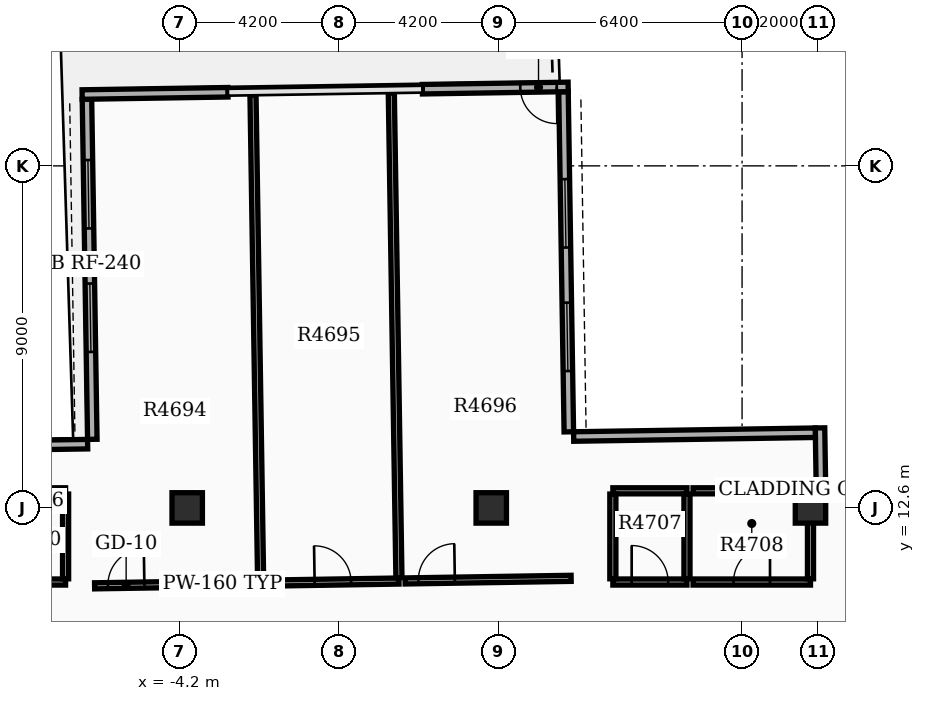
"""IFC4 building model, lengths in metres.
Left out: names, types, materials, properties, quantities, classifications, styles, units other than length and angle.
Written with IfcOpenShell. Run it as: python <this file> out.ifc"""

import sys

from ifc_helpers import new_model, si_unit, direction, frame, frame_2d, origin, origin_2d, place, context, subcontext, project, spatial, rectangle, extrude, element, fill, save


model = new_model("IFC4")
c1 = context("Model", 3, precision=1e-05, world=origin(), true_north=direction((0.0, 1.0)))
c2 = subcontext(c1, "Body", "Model", "MODEL_VIEW")
j1 = project(units=[si_unit("LENGTHUNIT", "METRE"), si_unit("PLANEANGLEUNIT", "RADIAN")], contexts=[c1])
p1 = place(None, origin())
s1 = spatial("IfcSite", under=j1, at=p1, CompositionType="ELEMENT")
p2 = place(p1, origin())
s2 = spatial("IfcBuilding", under=s1, at=p2, CompositionType="ELEMENT")
p3 = place(p2, frame((0.0, 0.0, 303.9)))
s3 = spatial("IfcBuildingStorey", under=s2, at=p3, CompositionType="ELEMENT", Elevation=303.9)
for number, where, z_axis, x_axis in (
    (1, (12.4, 12.6, 0.0), (0.0, 0.0, 1.0), (1.0, 0.0, 0.0)),
    (2, (4.0, 12.6, 0.0), (0.0, 0.0, 1.0), (1.0, 0.0, 0.0)),
    (3, (-4.0, 12.6, 0.0), (0.0, 0.0, 1.0), (1.0, 0.0, 0.0)),
):
    element("IfcColumn", number, at=place(p3, frame(where, z_axis=z_axis, x_axis=x_axis)), inside=s3, PredefinedType="COLUMN", context=c2, shape_type="SweptSolid", body=[
        extrude(rectangle(XDim=0.8, YDim=0.8, at=origin_2d()), origin(), (0.0, 0.0, 1.0), 4.5),
    ])
p4 = place(p3, frame((6.042, 14.602, 0.0), z_axis=(0.0, 0.0, 1.0), x_axis=(-0.015712579601, 0.999876549801, 0.0)))
e4 = element("IfcWall", 4, at=p4, inside=s3, PredefinedType="STANDARD", context=c2, shape_type="SweptSolid", body=[
    extrude(rectangle(XDim=8.95, YDim=0.25, at=frame_2d((4.475, 0.0))), origin(), (0.0, 0.0, 1.0), 3.73),
])
p5 = place(p4, frame((1.6, 0.0, 0.8)))
e5 = element("IfcOpeningElement", 5, at=p5, cuts=e4, PredefinedType="OPENING", context=c2, shape_type="SweptSolid", body=[
    extrude(rectangle(XDim=1.8, YDim=1.8, at=frame_2d((0.9, 0.9))), frame((0.0, 0.135, 0.0), z_axis=(0.0, -1.0, 0.0), x_axis=(1.0, 0.0, 0.0)), (0.0, 0.0, 1.0), 0.27),
])
p6 = place(p4, frame((4.85, 0.0, 0.8)))
e6 = element("IfcOpeningElement", 6, at=p6, cuts=e4, PredefinedType="OPENING", context=c2, shape_type="SweptSolid", body=[
    extrude(rectangle(XDim=1.8, YDim=1.8, at=frame_2d((0.9, 0.9))), frame((0.0, 0.135, 0.0), z_axis=(0.0, -1.0, 0.0), x_axis=(1.0, 0.0, 0.0)), (0.0, 0.0, 1.0), 0.27),
])
p7 = place(p3, frame((-6.638, 23.354, 0.0), z_axis=(0.0, 0.0, 1.0), x_axis=(0.015712579601, -0.999876549801, 0.0)))
e7 = element("IfcWall", 7, at=p7, inside=s3, PredefinedType="STANDARD", context=c2, shape_type="SweptSolid", body=[
    extrude(rectangle(XDim=8.95, YDim=0.25, at=frame_2d((4.475, 0.0))), origin(), (0.0, 0.0, 1.0), 3.73),
])
p8 = place(p7, frame((1.6, 0.0, 0.8)))
e8 = element("IfcOpeningElement", 8, at=p8, cuts=e7, PredefinedType="OPENING", context=c2, shape_type="SweptSolid", body=[
    extrude(rectangle(XDim=1.8, YDim=1.8, at=frame_2d((0.9, 0.9))), frame((0.0, 0.135, 0.0), z_axis=(0.0, -1.0, 0.0), x_axis=(1.0, 0.0, 0.0)), (0.0, 0.0, 1.0), 0.27),
])
p9 = place(p7, frame((4.85, 0.0, 0.8)))
e9 = element("IfcOpeningElement", 9, at=p9, cuts=e7, PredefinedType="OPENING", context=c2, shape_type="SweptSolid", body=[
    extrude(rectangle(XDim=1.8, YDim=1.8, at=frame_2d((0.9, 0.9))), frame((0.0, 0.135, 0.0), z_axis=(0.0, -1.0, 0.0), x_axis=(1.0, 0.0, 0.0)), (0.0, 0.0, 1.0), 0.27),
])
p10 = place(p3, frame((6.024, 23.677, 0.0), z_axis=(0.0, 0.0, 1.0), x_axis=(-0.999876487775, -0.015716526186, 0.0)))
e10 = element("IfcWall", 10, at=p10, inside=s3, PredefinedType="STANDARD", context=c2, shape_type="SweptSolid", body=[
    extrude(rectangle(XDim=3.837, YDim=0.25, at=frame_2d((1.918, 0.0))), origin(), (0.0, 0.0, 1.0), 3.73),
])
p11 = place(p10, frame((0.3, 0.0, 0.0)))
e11 = element("IfcOpeningElement", 11, at=p11, cuts=e10, PredefinedType="OPENING", context=c2, shape_type="SweptSolid", body=[
    extrude(rectangle(XDim=0.96, YDim=2.1, at=frame_2d((0.48, 1.05))), frame((0.0, 0.135, 0.0), z_axis=(0.0, -1.0, 0.0), x_axis=(1.0, 0.0, 0.0)), (0.0, 0.0, 1.0), 0.27),
])
p12 = place(p3, frame((-2.928, 23.537, 0.0), z_axis=(0.0, 0.0, 1.0), x_axis=(-0.99987650349, -0.015715526335, 0.0)))
e12 = element("IfcWall", 12, at=p12, inside=s3, PredefinedType="STANDARD", context=c2, shape_type="SweptSolid", body=[
    extrude(rectangle(XDim=3.837, YDim=0.25, at=frame_2d((1.918, 0.0))), origin(), (0.0, 0.0, 1.0), 3.73),
])
p13 = place(p3, frame((14.051, 13.102, 0.0), z_axis=(0.0, 0.0, 1.0), x_axis=(-0.999877904354, -0.015626144237, 0.0)))
e13 = element("IfcWall", 13, at=p13, inside=s3, PredefinedType="STANDARD", context=c2, shape_type="SweptSolid", body=[
    extrude(rectangle(XDim=1.25, YDim=0.25, at=frame_2d((0.625, 0.0))), origin(), (0.0, 0.0, 1.0), 3.73),
])
p14 = place(p3, frame((12.674, 13.206, 0.0), z_axis=(0.0, 0.0, 1.0), x_axis=(-0.015625635615, 0.999877912303, 0.0)))
e14 = element("IfcWall", 14, at=p14, inside=s3, PredefinedType="STANDARD", context=c2, shape_type="SweptSolid", body=[
    extrude(rectangle(XDim=1.5, YDim=0.25, at=frame_2d((0.75, 0.0))), origin(), (0.0, 0.0, 1.0), 3.73),
])
p15 = place(p3, frame((12.528, 14.579, 0.0), z_axis=(0.0, 0.0, 1.0), x_axis=(-0.999876749821, -0.015699846079, 0.0)))
e15 = element("IfcWall", 15, at=p15, inside=s3, PredefinedType="STANDARD", context=c2, shape_type="SweptSolid", body=[
    extrude(rectangle(XDim=6.36, YDim=0.25, at=frame_2d((3.18, 0.0))), origin(), (0.0, 0.0, 1.0), 3.73),
])
p16 = place(p3, frame((-12.979, 14.178, 0.0), z_axis=(0.0, 0.0, 1.0), x_axis=(0.999876740359, 0.015700448681, 0.0)))
e16 = element("IfcWall", 16, at=p16, inside=s3, PredefinedType="STANDARD", context=c2, shape_type="SweptSolid", body=[
    extrude(rectangle(XDim=6.36, YDim=0.25, at=frame_2d((3.18, 0.0))), origin(), (0.0, 0.0, 1.0), 3.73),
])
p17 = place(p3, frame((-6.437, 10.55, 0.0), z_axis=(0.0, 0.0, 1.0), x_axis=(0.999876776552, 0.015698143603, 0.0)))
e17 = element("IfcWall", 17, at=p17, inside=s3, PredefinedType="PARTITIONING", context=c2, shape_type="SweptSolid", body=[
    extrude(rectangle(XDim=4.37, YDim=0.16, at=frame_2d((2.185, 0.0))), origin(), (0.0, 0.0, 1.0), 3.72),
])
p18 = place(p17, frame((0.35, 0.0, 0.0)))
e18 = element("IfcOpeningElement", 18, at=p18, cuts=e17, PredefinedType="OPENING", context=c2, shape_type="SweptSolid", body=[
    extrude(rectangle(XDim=0.96, YDim=2.15, at=frame_2d((0.48, 1.075))), frame((0.0, 0.09, 0.0), z_axis=(0.0, -1.0, 0.0), x_axis=(1.0, 0.0, 0.0)), (0.0, 0.0, 1.0), 0.18),
])
p19 = place(p3, frame((-2.068, 10.704, 0.0), z_axis=(0.0, 0.0, 1.0), x_axis=(-0.015708274229, 0.999876617449, 0.0)))
e19 = element("IfcWall", 19, at=p19, inside=s3, PredefinedType="PARTITIONING", context=c2, shape_type="SweptSolid", body=[
    extrude(rectangle(XDim=12.76, YDim=0.16, at=frame_2d((6.38, 0.0))), origin(), (0.0, 0.0, 1.0), 3.72),
])
p20 = place(p3, frame((-1.907, 10.621, 0.0), z_axis=(0.0, 0.0, 1.0), x_axis=(0.999876509383, 0.015715151424, 0.0)))
e20 = element("IfcWall", 20, at=p20, inside=s3, PredefinedType="PARTITIONING", context=c2, shape_type="SweptSolid", body=[
    extrude(rectangle(XDim=3.48, YDim=0.16, at=frame_2d((1.74, 0.0))), origin(), (0.0, 0.0, 1.0), 3.72),
])
p21 = place(p20, frame((1.26, 0.0, 0.0)))
e21 = element("IfcOpeningElement", 21, at=p21, cuts=e20, PredefinedType="OPENING", context=c2, shape_type="SweptSolid", body=[
    extrude(rectangle(XDim=0.96, YDim=2.15, at=frame_2d((0.48, 1.075))), frame((0.0, 0.09, 0.0), z_axis=(0.0, -1.0, 0.0), x_axis=(1.0, 0.0, 0.0)), (0.0, 0.0, 1.0), 0.18),
])
p22 = place(p3, frame((1.571, 10.761, 0.0), z_axis=(0.0, 0.0, 1.0), x_axis=(-0.01572770348, 0.999876312022, 0.0)))
e22 = element("IfcWall", 22, at=p22, inside=s3, PredefinedType="PARTITIONING", context=c2, shape_type="SweptSolid", body=[
    extrude(rectangle(XDim=12.76, YDim=0.16, at=frame_2d((6.38, 0.0))), origin(), (0.0, 0.0, 1.0), 3.72),
])
p23 = place(p3, frame((1.732, 10.678, 0.0), z_axis=(0.0, 0.0, 1.0), x_axis=(0.999875884253, 0.015754875083, 0.0)))
e23 = element("IfcWall", 23, at=p23, inside=s3, PredefinedType="PARTITIONING", context=c2, shape_type="SweptSolid", body=[
    extrude(rectangle(XDim=4.37, YDim=0.16, at=frame_2d((2.185, 0.0))), origin(), (0.0, 0.0, 1.0), 3.72),
])
p24 = place(p23, frame((0.35, 0.0, 0.0)))
e24 = element("IfcOpeningElement", 24, at=p24, cuts=e23, PredefinedType="OPENING", context=c2, shape_type="SweptSolid", body=[
    extrude(rectangle(XDim=0.96, YDim=2.15, at=frame_2d((0.48, 1.075))), frame((0.0, 0.09, 0.0), z_axis=(0.0, -1.0, 0.0), x_axis=(1.0, 0.0, 0.0)), (0.0, 0.0, 1.0), 0.18),
])
p25 = place(p3, frame((-8.99, 10.65, 0.0), z_axis=(0.0, 0.0, 1.0), x_axis=(1.0, 0.0, 0.0)))
e25 = element("IfcWall", 25, at=p25, inside=s3, PredefinedType="PARTITIONING", context=c2, shape_type="SweptSolid", body=[
    extrude(rectangle(XDim=1.79, YDim=0.16, at=frame_2d((0.895, 0.0))), origin(), (0.0, 0.0, 1.0), 3.72),
])
p26 = place(p25, frame((0.445, 0.0, 0.0)))
e26 = element("IfcOpeningElement", 26, at=p26, cuts=e25, PredefinedType="OPENING", context=c2, shape_type="SweptSolid", body=[
    extrude(rectangle(XDim=0.9, YDim=2.15, at=frame_2d((0.45, 1.075))), frame((0.0, 0.09, 0.0), z_axis=(0.0, -1.0, 0.0), x_axis=(1.0, 0.0, 0.0)), (0.0, 0.0, 1.0), 0.18),
])
p27 = place(p3, frame((-8.99, 13.05, 0.0), z_axis=(0.0, 0.0, 1.0), x_axis=(1.0, 0.0, 0.0)))
e27 = element("IfcWall", 27, at=p27, inside=s3, PredefinedType="PARTITIONING", context=c2, shape_type="SweptSolid", body=[
    extrude(rectangle(XDim=1.79, YDim=0.16, at=frame_2d((0.895, 0.0))), origin(), (0.0, 0.0, 1.0), 3.72),
])
p28 = place(p3, frame((-7.2, 10.735, 0.0), z_axis=(0.0, 0.0, 1.0), x_axis=(0.0, 1.0, 0.0)))
e28 = element("IfcWall", 28, at=p28, inside=s3, PredefinedType="PARTITIONING", context=c2, shape_type="SweptSolid", body=[
    extrude(rectangle(XDim=2.23, YDim=0.16, at=frame_2d((1.115, 0.0))), origin(), (0.0, 0.0, 1.0), 3.72),
])
p29 = place(p3, frame((7.2, 10.65, 0.0), z_axis=(0.0, 0.0, 1.0), x_axis=(1.0, 0.0, 0.0)))
e29 = element("IfcWall", 29, at=p29, inside=s3, PredefinedType="PARTITIONING", context=c2, shape_type="SweptSolid", body=[
    extrude(rectangle(XDim=1.95, YDim=0.16, at=frame_2d((0.975, 0.0))), origin(), (0.0, 0.0, 1.0), 3.72),
])
p30 = place(p29, frame((0.495, 0.0, 0.0)))
e30 = element("IfcOpeningElement", 30, at=p30, cuts=e29, PredefinedType="OPENING", context=c2, shape_type="SweptSolid", body=[
    extrude(rectangle(XDim=0.96, YDim=2.15, at=frame_2d((0.48, 1.075))), frame((0.0, 0.09, 0.0), z_axis=(0.0, -1.0, 0.0), x_axis=(1.0, 0.0, 0.0)), (0.0, 0.0, 1.0), 0.18),
])
p31 = place(p3, frame((7.2, 13.05, 0.0), z_axis=(0.0, 0.0, 1.0), x_axis=(1.0, 0.0, 0.0)))
e31 = element("IfcWall", 31, at=p31, inside=s3, PredefinedType="PARTITIONING", context=c2, shape_type="SweptSolid", body=[
    extrude(rectangle(XDim=1.95, YDim=0.16, at=frame_2d((0.975, 0.0))), origin(), (0.0, 0.0, 1.0), 3.72),
])
for number, where, z_axis, x_axis in (
    (32, (7.2, 10.735, 0.0), (0.0, 0.0, 1.0), (0.0, 1.0, 0.0)),
    (33, (9.15, 10.735, 0.0), (0.0, 0.0, 1.0), (0.0, 1.0, 0.0)),
):
    element("IfcWall", number, at=place(p3, frame(where, z_axis=z_axis, x_axis=x_axis)), inside=s3, PredefinedType="PARTITIONING", context=c2, shape_type="SweptSolid", body=[
        extrude(rectangle(XDim=2.23, YDim=0.16, at=frame_2d((1.115, 0.0))), origin(), (0.0, 0.0, 1.0), 3.72),
    ])
p32 = place(p3, frame((9.31, 10.65, 0.0), z_axis=(0.0, 0.0, 1.0), x_axis=(1.0, 0.0, 0.0)))
e34 = element("IfcWall", 34, at=p32, inside=s3, PredefinedType="PARTITIONING", context=c2, shape_type="SweptSolid", body=[
    extrude(rectangle(XDim=3.09, YDim=0.16, at=frame_2d((1.545, 0.0))), origin(), (0.0, 0.0, 1.0), 3.72),
])
p33 = place(p32, frame((1.065, 0.0, 0.0)))
e35 = element("IfcOpeningElement", 35, at=p33, cuts=e34, PredefinedType="OPENING", context=c2, shape_type="SweptSolid", body=[
    extrude(rectangle(XDim=0.96, YDim=2.15, at=frame_2d((0.48, 1.075))), frame((0.0, 0.09, 0.0), z_axis=(0.0, -1.0, 0.0), x_axis=(1.0, 0.0, 0.0)), (0.0, 0.0, 1.0), 0.18),
])
p34 = place(p3, frame((9.31, 13.05, 0.0), z_axis=(0.0, 0.0, 1.0), x_axis=(1.0, 0.0, 0.0)))
e36 = element("IfcWall", 36, at=p34, inside=s3, PredefinedType="PARTITIONING", context=c2, shape_type="SweptSolid", body=[
    extrude(rectangle(XDim=3.09, YDim=0.16, at=frame_2d((1.545, 0.0))), origin(), (0.0, 0.0, 1.0), 3.72),
])
p35 = place(p3, frame((12.4, 10.735, 0.0), z_axis=(0.0, 0.0, 1.0), x_axis=(0.0, 1.0, 0.0)))
e37 = element("IfcWall", 37, at=p35, inside=s3, PredefinedType="PARTITIONING", context=c2, shape_type="SweptSolid", body=[
    extrude(rectangle(XDim=2.23, YDim=0.16, at=frame_2d((1.115, 0.0))), origin(), (0.0, 0.0, 1.0), 3.72),
])
p36 = place(p5, origin())
e38 = element("IfcWindow", 38, at=p36, inside=s3, PartitioningType="SINGLE_PANEL", PredefinedType="WINDOW", context=c2, shape_type="SweptSolid", body=[
    extrude(rectangle(XDim=1.8, YDim=1.8, at=frame_2d((0.9, 0.9))), frame((0.0, 0.03, 0.0), z_axis=(0.0, -1.0, 0.0), x_axis=(1.0, 0.0, 0.0)), (0.0, 0.0, 1.0), 0.06),
])
fill(e5, e38)
p37 = place(p6, origin())
e39 = element("IfcWindow", 39, at=p37, inside=s3, PartitioningType="SINGLE_PANEL", PredefinedType="WINDOW", context=c2, shape_type="SweptSolid", body=[
    extrude(rectangle(XDim=1.8, YDim=1.8, at=frame_2d((0.9, 0.9))), frame((0.0, 0.03, 0.0), z_axis=(0.0, -1.0, 0.0), x_axis=(1.0, 0.0, 0.0)), (0.0, 0.0, 1.0), 0.06),
])
fill(e6, e39)
p38 = place(p8, origin())
e40 = element("IfcWindow", 40, at=p38, inside=s3, PartitioningType="SINGLE_PANEL", PredefinedType="WINDOW", context=c2, shape_type="SweptSolid", body=[
    extrude(rectangle(XDim=1.8, YDim=1.8, at=frame_2d((0.9, 0.9))), frame((0.0, 0.03, 0.0), z_axis=(0.0, -1.0, 0.0), x_axis=(1.0, 0.0, 0.0)), (0.0, 0.0, 1.0), 0.06),
])
fill(e8, e40)
p39 = place(p9, origin())
e41 = element("IfcWindow", 41, at=p39, inside=s3, PartitioningType="SINGLE_PANEL", PredefinedType="WINDOW", context=c2, shape_type="SweptSolid", body=[
    extrude(rectangle(XDim=1.8, YDim=1.8, at=frame_2d((0.9, 0.9))), frame((0.0, 0.03, 0.0), z_axis=(0.0, -1.0, 0.0), x_axis=(1.0, 0.0, 0.0)), (0.0, 0.0, 1.0), 0.06),
])
fill(e9, e41)
p40 = place(p11, origin())
e42 = element("IfcDoor", 42, at=p40, inside=s3, OperationType="SINGLE_SWING_LEFT", PredefinedType="DOOR", context=c2, shape_type="SweptSolid", body=[
    extrude(rectangle(XDim=0.96, YDim=2.1, at=frame_2d((0.48, 1.05))), frame((0.0, 0.025, 0.0), z_axis=(0.0, -1.0, 0.0), x_axis=(1.0, 0.0, 0.0)), (0.0, 0.0, 1.0), 0.05),
])
fill(e11, e42)
p41 = place(p18, origin())
e43 = element("IfcDoor", 43, at=p41, inside=s3, OperationType="SINGLE_SWING_RIGHT", PredefinedType="DOOR", context=c2, shape_type="SweptSolid", body=[
    extrude(rectangle(XDim=0.96, YDim=2.15, at=frame_2d((0.48, 1.075))), frame((0.0, 0.025, 0.0), z_axis=(0.0, -1.0, 0.0), x_axis=(1.0, 0.0, 0.0)), (0.0, 0.0, 1.0), 0.05),
])
fill(e18, e43)
p42 = place(p21, origin())
e44 = element("IfcDoor", 44, at=p42, inside=s3, OperationType="SINGLE_SWING_LEFT", PredefinedType="DOOR", context=c2, shape_type="SweptSolid", body=[
    extrude(rectangle(XDim=0.96, YDim=2.15, at=frame_2d((0.48, 1.075))), frame((0.0, 0.025, 0.0), z_axis=(0.0, -1.0, 0.0), x_axis=(1.0, 0.0, 0.0)), (0.0, 0.0, 1.0), 0.05),
])
fill(e21, e44)
p43 = place(p24, origin())
e45 = element("IfcDoor", 45, at=p43, inside=s3, OperationType="SINGLE_SWING_RIGHT", PredefinedType="DOOR", context=c2, shape_type="SweptSolid", body=[
    extrude(rectangle(XDim=0.96, YDim=2.15, at=frame_2d((0.48, 1.075))), frame((0.0, 0.025, 0.0), z_axis=(0.0, -1.0, 0.0), x_axis=(1.0, 0.0, 0.0)), (0.0, 0.0, 1.0), 0.05),
])
fill(e24, e45)
p44 = place(p30, origin())
e46 = element("IfcDoor", 46, at=p44, inside=s3, OperationType="SINGLE_SWING_LEFT", PredefinedType="DOOR", context=c2, shape_type="SweptSolid", body=[
    extrude(rectangle(XDim=0.96, YDim=2.15, at=frame_2d((0.48, 1.075))), frame((0.0, 0.025, 0.0), z_axis=(0.0, -1.0, 0.0), x_axis=(1.0, 0.0, 0.0)), (0.0, 0.0, 1.0), 0.05),
])
fill(e30, e46)
p45 = place(p33, origin())
e47 = element("IfcDoor", 47, at=p45, inside=s3, OperationType="SINGLE_SWING_RIGHT", PredefinedType="DOOR", context=c2, shape_type="SweptSolid", body=[
    extrude(rectangle(XDim=0.96, YDim=2.15, at=frame_2d((0.48, 1.075))), frame((0.0, 0.025, 0.0), z_axis=(0.0, -1.0, 0.0), x_axis=(1.0, 0.0, 0.0)), (0.0, 0.0, 1.0), 0.05),
])
fill(e35, e47)
save(model, sys.argv[1])
